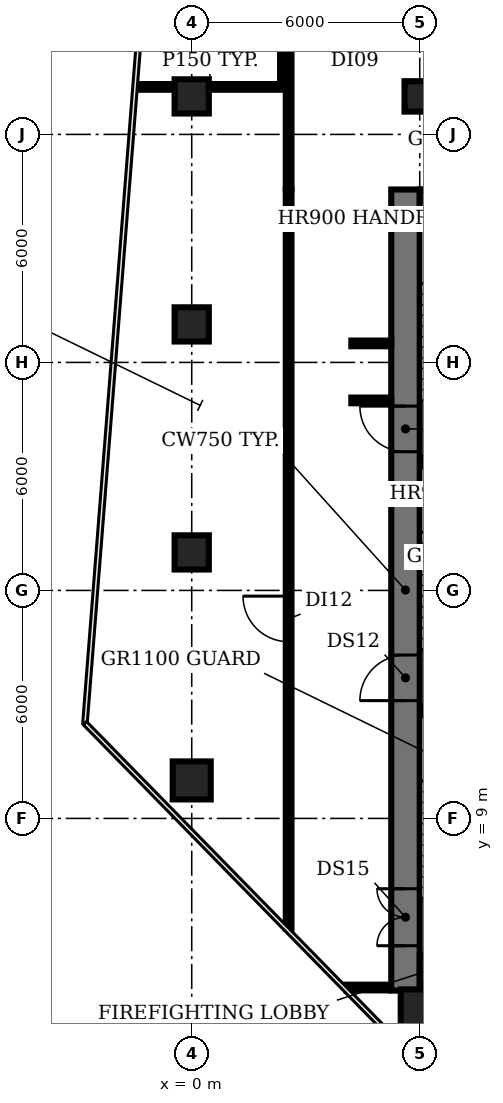
"""IFC4 building model, lengths in metres.
Left out: names, types, materials, properties, quantities, classifications, styles, units other than length and angle.
Written with IfcOpenShell. Run it as: python <this file> out.ifc"""

import sys

from ifc_helpers import new_model, si_unit, direction, frame, frame_2d, origin, origin_2d, place, context, subcontext, project, spatial, rectangle, circle, extrude, element, fill, save


model = new_model("IFC4")
c1 = context("Model", 3, precision=1e-05, world=origin(), true_north=direction((0.0, 1.0)))
c2 = subcontext(c1, "Body", "Model", "MODEL_VIEW")
j1 = project(units=[si_unit("LENGTHUNIT", "METRE"), si_unit("PLANEANGLEUNIT", "RADIAN")], contexts=[c1])
p1 = place(None, origin())
s1 = spatial("IfcSite", under=j1, at=p1, CompositionType="ELEMENT")
p2 = place(p1, origin())
s2 = spatial("IfcBuilding", under=s1, at=p2, CompositionType="ELEMENT")
p3 = place(p2, frame((0.0, 0.0, 129.8)))
s3 = spatial("IfcBuildingStorey", under=s2, at=p3, CompositionType="ELEMENT", Elevation=129.8)
p4 = place(p3, frame((0.0, 10.0, 0.0), z_axis=(0.0, 0.0, 1.0), x_axis=(1.0, 0.0, 0.0)))
e1 = element("IfcColumn", 1, at=p4, inside=s3, PredefinedType="COLUMN", context=c2, shape_type="SweptSolid", body=[
    extrude(circle(Radius=0.5, at=origin_2d()), origin(), (0.0, 0.0, 1.0), 3.85),
])
for number, where, z_axis, x_axis in (
    (2, (0.0, 16.0, 0.0), (0.0, 0.0, 1.0), (1.0, 0.0, 0.0)),
    (3, (0.0, 22.0, 0.0), (0.0, 0.0, 1.0), (1.0, 0.0, 0.0)),
    (4, (0.0, 28.0, 0.0), (0.0, 0.0, 1.0), (1.0, 0.0, 0.0)),
):
    element("IfcColumn", number, at=place(p3, frame(where, z_axis=z_axis, x_axis=x_axis)), inside=s3, PredefinedType="COLUMN", context=c2, shape_type="SweptSolid", body=[
        extrude(rectangle(XDim=0.9, YDim=0.9, at=origin_2d()), origin(), (0.0, 0.0, 1.0), 3.85),
    ])
p5 = place(p3, frame((6.0, 4.0, 0.0), z_axis=(0.0, 0.0, 1.0), x_axis=(1.0, 0.0, 0.0)))
e5 = element("IfcColumn", 5, at=p5, inside=s3, PredefinedType="COLUMN", context=c2, shape_type="SweptSolid", body=[
    extrude(circle(Radius=0.5, at=origin_2d()), origin(), (0.0, 0.0, 1.0), 3.85),
])
p6 = place(p3, frame((6.0, 28.0, 0.0), z_axis=(0.0, 0.0, 1.0), x_axis=(1.0, 0.0, 0.0)))
e6 = element("IfcColumn", 6, at=p6, inside=s3, PredefinedType="COLUMN", context=c2, shape_type="SweptSolid", body=[
    extrude(rectangle(XDim=0.8, YDim=0.8, at=origin_2d()), origin(), (0.0, 0.0, 1.0), 3.85),
])
for number, where, z_axis, x_axis in (
    (7, (6.0, 11.825, 0.0), (0.0, 0.0, 1.0), (1.0, 0.0, 0.0)),
    (8, (6.0, 18.375, 0.0), (0.0, 0.0, 1.0), (1.0, 0.0, 0.0)),
):
    element("IfcWall", number, at=place(p3, frame(where, z_axis=z_axis, x_axis=x_axis)), inside=s3, PredefinedType="SHEAR", context=c2, shape_type="SweptSolid", body=[
        extrude(rectangle(XDim=3.15, YDim=0.25, at=frame_2d((1.575, 0.0))), origin(), (0.0, 0.0, 1.0), 3.85),
    ])
p7 = place(p3, frame((5.625, 4.47, 0.0), z_axis=(0.0, 0.0, 1.0), x_axis=(0.0, 1.0, 0.0)))
e9 = element("IfcWall", 9, at=p7, inside=s3, PredefinedType="SHEAR", context=c2, shape_type="SweptSolid", body=[
    extrude(rectangle(XDim=21.08, YDim=0.75, at=frame_2d((10.54, 0.0))), origin(), (0.0, 0.0, 1.0), 3.85),
])
p8 = place(p7, frame((1.18, 0.0, 0.0)))
e10 = element("IfcOpeningElement", 10, at=p8, cuts=e9, PredefinedType="OPENING", context=c2, shape_type="SweptSolid", body=[
    extrude(rectangle(XDim=1.5, YDim=2.1, at=frame_2d((0.75, 1.05))), frame((0.0, 0.385, 0.0), z_axis=(0.0, -1.0, 0.0), x_axis=(1.0, 0.0, 0.0)), (0.0, 0.0, 1.0), 0.77),
])
p9 = place(p7, frame((7.63, 0.0, 0.0)))
e11 = element("IfcOpeningElement", 11, at=p9, cuts=e9, PredefinedType="OPENING", context=c2, shape_type="SweptSolid", body=[
    extrude(rectangle(XDim=1.2, YDim=2.1, at=frame_2d((0.6, 1.05))), frame((0.0, 0.385, 0.0), z_axis=(0.0, -1.0, 0.0), x_axis=(1.0, 0.0, 0.0)), (0.0, 0.0, 1.0), 0.77),
])
p10 = place(p7, frame((14.18, 0.0, 0.0)))
e12 = element("IfcOpeningElement", 12, at=p10, cuts=e9, PredefinedType="OPENING", context=c2, shape_type="SweptSolid", body=[
    extrude(rectangle(XDim=1.2, YDim=2.1, at=frame_2d((0.6, 1.05))), frame((0.0, 0.385, 0.0), z_axis=(0.0, -1.0, 0.0), x_axis=(1.0, 0.0, 0.0)), (0.0, 0.0, 1.0), 0.77),
])
p11 = place(p3, frame((24.0, 5.025, 0.0), z_axis=(0.0, 0.0, 1.0), x_axis=(-1.0, 0.0, 0.0)))
e13 = element("IfcWall", 13, at=p11, inside=s3, PredefinedType="SHEAR", context=c2, shape_type="SweptSolid", body=[
    extrude(rectangle(XDim=18.0, YDim=0.75, at=frame_2d((9.0, 0.0))), origin(), (0.0, 0.0, 1.0), 3.85),
])
p12 = place(p11, frame((0.825, 0.0, 0.0)))
e14 = element("IfcOpeningElement", 14, at=p12, cuts=e13, PredefinedType="OPENING", context=c2, shape_type="SweptSolid", body=[
    extrude(rectangle(XDim=1.5, YDim=2.1, at=frame_2d((0.75, 1.05))), frame((0.0, 0.385, 0.0), z_axis=(0.0, -1.0, 0.0), x_axis=(1.0, 0.0, 0.0)), (0.0, 0.0, 1.0), 0.77),
])
p13 = place(p11, frame((15.675, 0.0, 0.0)))
e15 = element("IfcOpeningElement", 15, at=p13, cuts=e13, PredefinedType="OPENING", context=c2, shape_type="SweptSolid", body=[
    extrude(rectangle(XDim=1.5, YDim=2.1, at=frame_2d((0.75, 1.05))), frame((0.0, 0.385, 0.0), z_axis=(0.0, -1.0, 0.0), x_axis=(1.0, 0.0, 0.0)), (0.0, 0.0, 1.0), 0.77),
])
p14 = place(p11, frame((13.0, 0.0, 0.0)))
e16 = element("IfcOpeningElement", 16, at=p14, cuts=e13, PredefinedType="OPENING", context=c2, shape_type="SweptSolid", body=[
    extrude(rectangle(XDim=1.2, YDim=2.1, at=frame_2d((0.6, 1.05))), frame((0.0, 0.385, 0.0), z_axis=(0.0, -1.0, 0.0), x_axis=(1.0, 0.0, 0.0)), (0.0, 0.0, 1.0), 0.77),
])
p15 = place(p11, frame((4.35, 0.0, 0.0)))
e17 = element("IfcOpeningElement", 17, at=p15, cuts=e13, PredefinedType="OPENING", context=c2, shape_type="SweptSolid", body=[
    extrude(rectangle(XDim=1.0, YDim=2.1, at=frame_2d((0.5, 1.05))), frame((0.0, 0.385, 0.0), z_axis=(0.0, -1.0, 0.0), x_axis=(1.0, 0.0, 0.0)), (0.0, 0.0, 1.0), 0.77),
])
p16 = place(p3, frame((6.0, 25.175, 0.0), z_axis=(0.0, 0.0, 1.0), x_axis=(1.0, 0.0, 0.0)))
e18 = element("IfcWall", 18, at=p16, inside=s3, PredefinedType="SHEAR", context=c2, shape_type="SweptSolid", body=[
    extrude(rectangle(XDim=18.0, YDim=0.75, at=frame_2d((9.0, 0.0))), origin(), (0.0, 0.0, 1.0), 3.85),
])
p17 = place(p3, frame((-1.44, 28.25, 0.0), z_axis=(0.0, 0.0, 1.0), x_axis=(1.0, 0.0, 0.0)))
e19 = element("IfcWall", 19, at=p17, inside=s3, PredefinedType="PARTITIONING", context=c2, shape_type="SweptSolid", body=[
    extrude(rectangle(XDim=3.84, YDim=0.15, at=frame_2d((1.92, 0.0))), origin(), (0.0, 0.0, 1.0), 2.83),
])
p18 = place(p3, frame((2.4, 28.25, 0.0), z_axis=(0.0, 0.0, 1.0), x_axis=(0.0, 1.0, 0.0)))
e20 = element("IfcWall", 20, at=p18, inside=s3, PredefinedType="PARTITIONING", context=c2, shape_type="SweptSolid", body=[
    extrude(rectangle(XDim=6.0, YDim=0.15, at=frame_2d((3.0, 0.0))), origin(), (0.0, 0.0, 1.0), 2.83),
])
p19 = place(p3, frame((2.55, 6.1, 0.0), z_axis=(0.0, 0.0, 1.0), x_axis=(0.0, 1.0, 0.0)))
e21 = element("IfcWall", 21, at=p19, inside=s3, PredefinedType="PARTITIONING", context=c2, shape_type="SweptSolid", body=[
    extrude(rectangle(XDim=19.45, YDim=0.15, at=frame_2d((9.725, 0.0))), origin(), (0.0, 0.0, 1.0), 2.83),
])
p20 = place(p19, frame((7.55, 0.0, 0.0)))
e22 = element("IfcOpeningElement", 22, at=p20, cuts=e21, PredefinedType="OPENING", context=c2, shape_type="SweptSolid", body=[
    extrude(rectangle(XDim=1.2, YDim=2.1, at=frame_2d((0.6, 1.05))), frame((0.0, 0.085, 0.0), z_axis=(0.0, -1.0, 0.0), x_axis=(1.0, 0.0, 0.0)), (0.0, 0.0, 1.0), 0.17),
])
p21 = place(p3, frame((2.55, 25.55, 0.0), z_axis=(0.0, 0.0, 1.0), x_axis=(0.0, 1.0, 0.0)))
e23 = element("IfcWall", 23, at=p21, inside=s3, PredefinedType="PARTITIONING", context=c2, shape_type="SweptSolid", body=[
    extrude(rectangle(XDim=3.9, YDim=0.15, at=frame_2d((1.95, 0.0))), origin(), (0.0, 0.0, 1.0), 2.83),
])
p22 = place(p3, frame((4.07, 4.55, 0.0), z_axis=(0.0, 0.0, 1.0), x_axis=(1.0, 0.0, 0.0)))
e24 = element("IfcWall", 24, at=p22, inside=s3, PredefinedType="PARTITIONING", context=c2, shape_type="SweptSolid", body=[
    extrude(rectangle(XDim=1.08, YDim=0.15, at=frame_2d((0.54, 0.0))), origin(), (0.0, 0.0, 1.0), 2.83),
])
for number, where, z_axis, x_axis in (
    (25, (4.2, 20.0, 0.0), (0.0, 0.0, 1.0), (1.0, 0.0, 0.0)),
    (26, (4.2, 21.5, 0.0), (0.0, 0.0, 1.0), (1.0, 0.0, 0.0)),
):
    element("IfcWall", number, at=place(p3, frame(where, z_axis=z_axis, x_axis=x_axis)), inside=s3, PredefinedType="PARTITIONING", context=c2, shape_type="SweptSolid", body=[
        extrude(rectangle(XDim=1.05, YDim=0.15, at=frame_2d((0.525, 0.0))), origin(), (0.0, 0.0, 1.0), 2.83),
    ])
p23 = place(p8, origin())
e27 = element("IfcDoor", 27, at=p23, inside=s3, OperationType="DOUBLE_DOOR_SINGLE_SWING", PredefinedType="DOOR", context=c2, shape_type="SweptSolid", body=[
    extrude(rectangle(XDim=1.5, YDim=2.1, at=frame_2d((0.75, 1.05))), frame((0.0, 0.025, 0.0), z_axis=(0.0, -1.0, 0.0), x_axis=(1.0, 0.0, 0.0)), (0.0, 0.0, 1.0), 0.05),
])
fill(e10, e27)
p24 = place(p9, origin())
e28 = element("IfcDoor", 28, at=p24, inside=s3, OperationType="SINGLE_SWING_LEFT", PredefinedType="DOOR", context=c2, shape_type="SweptSolid", body=[
    extrude(rectangle(XDim=1.2, YDim=2.1, at=frame_2d((0.6, 1.05))), frame((0.0, 0.025, 0.0), z_axis=(0.0, -1.0, 0.0), x_axis=(1.0, 0.0, 0.0)), (0.0, 0.0, 1.0), 0.05),
])
fill(e11, e28)
p25 = place(p10, origin())
e29 = element("IfcDoor", 29, at=p25, inside=s3, OperationType="SINGLE_SWING_RIGHT", PredefinedType="DOOR", context=c2, shape_type="SweptSolid", body=[
    extrude(rectangle(XDim=1.2, YDim=2.1, at=frame_2d((0.6, 1.05))), frame((0.0, 0.025, 0.0), z_axis=(0.0, -1.0, 0.0), x_axis=(1.0, 0.0, 0.0)), (0.0, 0.0, 1.0), 0.05),
])
fill(e12, e29)
p26 = place(p20, origin())
e30 = element("IfcDoor", 30, at=p26, inside=s3, OperationType="SINGLE_SWING_RIGHT", PredefinedType="DOOR", context=c2, shape_type="SweptSolid", body=[
    extrude(rectangle(XDim=1.2, YDim=2.1, at=frame_2d((0.6, 1.05))), frame((0.0, 0.025, 0.0), z_axis=(0.0, -1.0, 0.0), x_axis=(1.0, 0.0, 0.0)), (0.0, 0.0, 1.0), 0.05),
])
fill(e22, e30)
save(model, sys.argv[1])
